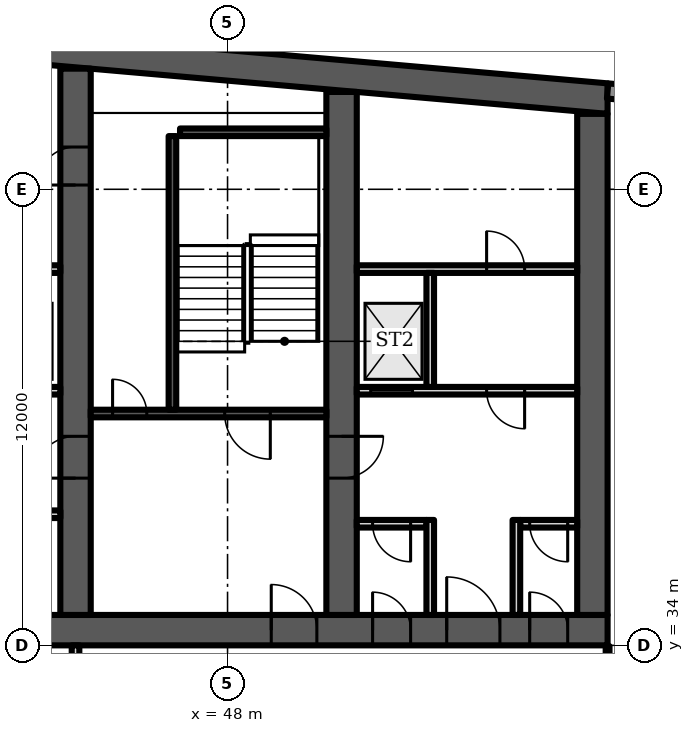
"""IFC4 building model, lengths in metres.
Left out: names, types, materials, properties, quantities, classifications, styles, units other than length and angle.
Written with IfcOpenShell. Run it as: python <this file> out.ifc"""

import sys

from ifc_helpers import new_model, si_unit, direction, frame, frame_2d, origin, place, context, subcontext, project, spatial, polyline, rectangle, outline, extrude, element, fill, save


model = new_model("IFC4")
c1 = context("Model", 3, precision=1e-05, world=origin(), true_north=direction((0.0, 1.0)))
c2 = subcontext(c1, "Body", "Model", "MODEL_VIEW")
j1 = project(units=[si_unit("LENGTHUNIT", "METRE"), si_unit("PLANEANGLEUNIT", "RADIAN")], contexts=[c1])
p1 = place(None, origin())
s1 = spatial("IfcSite", under=j1, at=p1, CompositionType="ELEMENT")
p2 = place(p1, origin())
s2 = spatial("IfcBuilding", under=s1, at=p2, CompositionType="ELEMENT")
p3 = place(p2, frame((0.0, 0.0, 177.1)))
s3 = spatial("IfcBuildingStorey", under=s2, at=p3, CompositionType="ELEMENT", Elevation=177.1)
p4 = place(p3, frame((0.0, 0.0, -0.0)))
e1 = element("IfcWall", 1, at=p4, inside=s3, PredefinedType="SHEAR", context=c2, shape_type="SweptSolid", body=[
    extrude(outline(polyline([(16.0, 47.984), (37.0, 49.822), (58.0, 47.984), (58.0, 48.787), (37.0, 50.625), (16.0, 48.787), (16.0, 47.984)])), origin(), (0.0, 0.0, 1.0), 3.6),
])
p5 = place(p3, frame((16.0, 34.4, 0.0), z_axis=(0.0, 0.0, 1.0), x_axis=(1.0, 0.0, 0.0)))
e2 = element("IfcWall", 2, at=p5, inside=s3, PredefinedType="SHEAR", context=c2, shape_type="SweptSolid", body=[
    extrude(rectangle(XDim=42.0, YDim=0.8, at=frame_2d((21.0, 0.0))), origin(), (0.0, 0.0, 1.0), 3.6),
])
p6 = place(p5, frame((1.75, 0.0, 0.0)))
e3 = element("IfcOpeningElement", 3, at=p6, cuts=e2, PredefinedType="OPENING", context=c2, shape_type="SweptSolid", body=[
    extrude(rectangle(XDim=1.0, YDim=2.1, at=frame_2d((0.5, 1.05))), frame((0.0, 0.41, 0.0), z_axis=(0.0, -1.0, 0.0), x_axis=(1.0, 0.0, 0.0)), (0.0, 0.0, 1.0), 0.82),
])
p7 = place(p5, frame((4.65, 0.0, 0.0)))
e4 = element("IfcOpeningElement", 4, at=p7, cuts=e2, PredefinedType="OPENING", context=c2, shape_type="SweptSolid", body=[
    extrude(rectangle(XDim=1.0, YDim=2.1, at=frame_2d((0.5, 1.05))), frame((0.0, 0.41, 0.0), z_axis=(0.0, -1.0, 0.0), x_axis=(1.0, 0.0, 0.0)), (0.0, 0.0, 1.0), 0.82),
])
p8 = place(p5, frame((7.65, 0.0, 0.0)))
e5 = element("IfcOpeningElement", 5, at=p8, cuts=e2, PredefinedType="OPENING", context=c2, shape_type="SweptSolid", body=[
    extrude(rectangle(XDim=1.2, YDim=2.1, at=frame_2d((0.6, 1.05))), frame((0.0, 0.41, 0.0), z_axis=(0.0, -1.0, 0.0), x_axis=(1.0, 0.0, 0.0)), (0.0, 0.0, 1.0), 0.82),
])
p9 = place(p5, frame((14.767, 0.0, 0.0)))
e6 = element("IfcOpeningElement", 6, at=p9, cuts=e2, PredefinedType="OPENING", context=c2, shape_type="SweptSolid", body=[
    extrude(rectangle(XDim=1.1, YDim=2.1, at=frame_2d((0.55, 1.05))), frame((0.0, 0.41, 0.0), z_axis=(0.0, -1.0, 0.0), x_axis=(1.0, 0.0, 0.0)), (0.0, 0.0, 1.0), 0.82),
])
p10 = place(p5, frame((19.133, 0.0, 0.0)))
e7 = element("IfcOpeningElement", 7, at=p10, cuts=e2, PredefinedType="OPENING", context=c2, shape_type="SweptSolid", body=[
    extrude(rectangle(XDim=1.1, YDim=2.1, at=frame_2d((0.55, 1.05))), frame((0.0, 0.41, 0.0), z_axis=(0.0, -1.0, 0.0), x_axis=(1.0, 0.0, 0.0)), (0.0, 0.0, 1.0), 0.82),
])
p11 = place(p5, frame((16.8, 0.0, 0.0)))
e8 = element("IfcOpeningElement", 8, at=p11, cuts=e2, PredefinedType="OPENING", context=c2, shape_type="SweptSolid", body=[
    extrude(rectangle(XDim=1.4, YDim=2.1, at=frame_2d((0.7, 1.05))), frame((0.0, 0.41, 0.0), z_axis=(0.0, -1.0, 0.0), x_axis=(1.0, 0.0, 0.0)), (0.0, 0.0, 1.0), 0.82),
])
p12 = place(p5, frame((21.767, 0.0, 0.0)))
e9 = element("IfcOpeningElement", 9, at=p12, cuts=e2, PredefinedType="OPENING", context=c2, shape_type="SweptSolid", body=[
    extrude(rectangle(XDim=1.1, YDim=2.1, at=frame_2d((0.55, 1.05))), frame((0.0, 0.41, 0.0), z_axis=(0.0, -1.0, 0.0), x_axis=(1.0, 0.0, 0.0)), (0.0, 0.0, 1.0), 0.82),
])
p13 = place(p5, frame((23.95, 0.0, 0.0)))
e10 = element("IfcOpeningElement", 10, at=p13, cuts=e2, PredefinedType="OPENING", context=c2, shape_type="SweptSolid", body=[
    extrude(rectangle(XDim=1.1, YDim=2.1, at=frame_2d((0.55, 1.05))), frame((0.0, 0.41, 0.0), z_axis=(0.0, -1.0, 0.0), x_axis=(1.0, 0.0, 0.0)), (0.0, 0.0, 1.0), 0.82),
])
p14 = place(p5, frame((26.133, 0.0, 0.0)))
e11 = element("IfcOpeningElement", 11, at=p14, cuts=e2, PredefinedType="OPENING", context=c2, shape_type="SweptSolid", body=[
    extrude(rectangle(XDim=1.1, YDim=2.1, at=frame_2d((0.55, 1.05))), frame((0.0, 0.41, 0.0), z_axis=(0.0, -1.0, 0.0), x_axis=(1.0, 0.0, 0.0)), (0.0, 0.0, 1.0), 0.82),
])
p15 = place(p5, frame((33.15, 0.0, 0.0)))
e12 = element("IfcOpeningElement", 12, at=p15, cuts=e2, PredefinedType="OPENING", context=c2, shape_type="SweptSolid", body=[
    extrude(rectangle(XDim=1.2, YDim=2.1, at=frame_2d((0.6, 1.05))), frame((0.0, 0.41, 0.0), z_axis=(0.0, -1.0, 0.0), x_axis=(1.0, 0.0, 0.0)), (0.0, 0.0, 1.0), 0.82),
])
p16 = place(p5, frame((35.817, 0.0, 0.0)))
e13 = element("IfcOpeningElement", 13, at=p16, cuts=e2, PredefinedType="OPENING", context=c2, shape_type="SweptSolid", body=[
    extrude(rectangle(XDim=1.0, YDim=2.1, at=frame_2d((0.5, 1.05))), frame((0.0, 0.41, 0.0), z_axis=(0.0, -1.0, 0.0), x_axis=(1.0, 0.0, 0.0)), (0.0, 0.0, 1.0), 0.82),
])
p17 = place(p5, frame((39.95, 0.0, 0.0)))
e14 = element("IfcOpeningElement", 14, at=p17, cuts=e2, PredefinedType="OPENING", context=c2, shape_type="SweptSolid", body=[
    extrude(rectangle(XDim=1.0, YDim=2.1, at=frame_2d((0.5, 1.05))), frame((0.0, 0.41, 0.0), z_axis=(0.0, -1.0, 0.0), x_axis=(1.0, 0.0, 0.0)), (0.0, 0.0, 1.0), 0.82),
])
p18 = place(p5, frame((37.767, 0.0, 0.0)))
e15 = element("IfcOpeningElement", 15, at=p18, cuts=e2, PredefinedType="OPENING", context=c2, shape_type="SweptSolid", body=[
    extrude(rectangle(XDim=1.4, YDim=2.1, at=frame_2d((0.7, 1.05))), frame((0.0, 0.41, 0.0), z_axis=(0.0, -1.0, 0.0), x_axis=(1.0, 0.0, 0.0)), (0.0, 0.0, 1.0), 0.82),
])
p19 = place(p3, frame((44.0, 34.8, 0.0), z_axis=(0.0, 0.0, 1.0), x_axis=(0.0, 1.0, 0.0)))
e16 = element("IfcWall", 16, at=p19, inside=s3, PredefinedType="SHEAR", context=c2, shape_type="SweptSolid", body=[
    extrude(rectangle(XDim=14.374, YDim=0.8, at=frame_2d((7.187, 0.0))), origin(), (0.0, 0.0, 1.0), 3.6),
])
p20 = place(p19, frame((11.312, 0.0, 0.0)))
e17 = element("IfcOpeningElement", 17, at=p20, cuts=e16, PredefinedType="OPENING", context=c2, shape_type="SweptSolid", body=[
    extrude(rectangle(XDim=1.0, YDim=2.1, at=frame_2d((0.5, 1.05))), frame((0.0, 0.41, 0.0), z_axis=(0.0, -1.0, 0.0), x_axis=(1.0, 0.0, 0.0)), (0.0, 0.0, 1.0), 0.82),
])
p21 = place(p19, frame((3.6, 0.0, 0.0)))
e18 = element("IfcOpeningElement", 18, at=p21, cuts=e16, PredefinedType="OPENING", context=c2, shape_type="SweptSolid", body=[
    extrude(rectangle(XDim=1.1, YDim=2.1, at=frame_2d((0.55, 1.05))), frame((0.0, 0.41, 0.0), z_axis=(0.0, -1.0, 0.0), x_axis=(1.0, 0.0, 0.0)), (0.0, 0.0, 1.0), 0.82),
])
p22 = place(p3, frame((51.0, 34.8, 0.0), z_axis=(0.0, 0.0, 1.0), x_axis=(0.0, 1.0, 0.0)))
e19 = element("IfcWall", 19, at=p22, inside=s3, PredefinedType="SHEAR", context=c2, shape_type="SweptSolid", body=[
    extrude(rectangle(XDim=13.762, YDim=0.8, at=frame_2d((6.881, 0.0))), origin(), (0.0, 0.0, 1.0), 3.6),
])
p23 = place(p22, frame((3.6, 0.0, 0.0)))
e20 = element("IfcOpeningElement", 20, at=p23, cuts=e19, PredefinedType="OPENING", context=c2, shape_type="SweptSolid", body=[
    extrude(rectangle(XDim=1.1, YDim=2.1, at=frame_2d((0.55, 1.05))), frame((0.0, 0.41, 0.0), z_axis=(0.0, -1.0, 0.0), x_axis=(1.0, 0.0, 0.0)), (0.0, 0.0, 1.0), 0.82),
])
p24 = place(p3, frame((57.6, 34.8, 0.0), z_axis=(0.0, 0.0, 1.0), x_axis=(0.0, 1.0, 0.0)))
e21 = element("IfcWall", 21, at=p24, inside=s3, PredefinedType="SHEAR", context=c2, shape_type="SweptSolid", body=[
    extrude(rectangle(XDim=13.184, YDim=0.8, at=frame_2d((6.592, 0.0))), origin(), (0.0, 0.0, 1.0), 3.6),
])
p25 = place(p3, frame((60.983, 48.326, 0.0), z_axis=(0.0, 0.0, 1.0), x_axis=(-0.996194, 0.087168, 0.0)))
e22 = element("IfcWall", 22, at=p25, inside=s3, PredefinedType="SOLIDWALL", context=c2, shape_type="SweptSolid", body=[
    extrude(rectangle(XDim=2.994, YDim=0.4, at=frame_2d((1.497, 0.0))), origin(), (0.0, 0.0, 1.0), 3.2),
])
p26 = place(p3, frame((37.4, 40.7, 0.0), z_axis=(0.0, 0.0, 1.0), x_axis=(1.0, 0.0, 0.0)))
e23 = element("IfcWall", 23, at=p26, inside=s3, PredefinedType="PARTITIONING", context=c2, shape_type="SweptSolid", body=[
    extrude(rectangle(XDim=6.2, YDim=0.2, at=frame_2d((3.1, 0.0))), origin(), (0.0, 0.0, 1.0), 3.2),
])
p27 = place(p26, frame((0.367, 0.0, 0.0)))
e24 = element("IfcOpeningElement", 24, at=p27, cuts=e23, PredefinedType="OPENING", context=c2, shape_type="SweptSolid", body=[
    extrude(rectangle(XDim=1.1, YDim=2.1, at=frame_2d((0.55, 1.05))), frame((0.0, 0.11, 0.0), z_axis=(0.0, -1.0, 0.0), x_axis=(1.0, 0.0, 0.0)), (0.0, 0.0, 1.0), 0.22),
])
p28 = place(p26, frame((2.55, 0.0, 0.0)))
e25 = element("IfcOpeningElement", 25, at=p28, cuts=e23, PredefinedType="OPENING", context=c2, shape_type="SweptSolid", body=[
    extrude(rectangle(XDim=1.1, YDim=2.1, at=frame_2d((0.55, 1.05))), frame((0.0, 0.11, 0.0), z_axis=(0.0, -1.0, 0.0), x_axis=(1.0, 0.0, 0.0)), (0.0, 0.0, 1.0), 0.22),
])
p29 = place(p26, frame((4.733, 0.0, 0.0)))
e26 = element("IfcOpeningElement", 26, at=p29, cuts=e23, PredefinedType="OPENING", context=c2, shape_type="SweptSolid", body=[
    extrude(rectangle(XDim=1.1, YDim=2.1, at=frame_2d((0.55, 1.05))), frame((0.0, 0.11, 0.0), z_axis=(0.0, -1.0, 0.0), x_axis=(1.0, 0.0, 0.0)), (0.0, 0.0, 1.0), 0.22),
])
p30 = place(p3, frame((0.0, 0.0, -0.0)))
e27 = element("IfcWall", 27, at=p30, inside=s3, PredefinedType="PARTITIONING", context=c2, shape_type="SweptSolid", body=[
    extrude(outline(polyline([(41.567, 37.1), (39.433, 37.1), (39.433, 34.8), (39.233, 34.8), (39.233, 37.65), (37.4, 37.65), (37.4, 37.85), (39.233, 37.85), (39.433, 37.85), (39.433, 37.3), (41.567, 37.3), (41.567, 37.55), (41.767, 37.55), (43.6, 37.55), (43.6, 37.35), (41.767, 37.35), (41.767, 34.8), (41.567, 34.8), (41.567, 37.1)])), origin(), (0.0, 0.0, 1.0), 3.2),
])
p31 = place(p3, frame((0.0, 0.0, -0.0)))
e28 = element("IfcWall", 28, at=p31, inside=s3, PredefinedType="PARTITIONING", context=c2, shape_type="SweptSolid", body=[
    extrude(outline(polyline([(39.433, 40.8), (39.233, 40.8), (39.233, 43.8), (37.4, 43.8), (37.4, 44.0), (43.6, 44.0), (43.6, 43.8), (41.767, 43.8), (41.767, 40.8), (41.567, 40.8), (41.567, 43.8), (39.433, 43.8), (39.433, 40.8)])), origin(), (0.0, 0.0, 1.0), 3.2),
])
p32 = place(p3, frame((44.4, 40.1, 0.0), z_axis=(0.0, 0.0, 1.0), x_axis=(1.0, 0.0, 0.0)))
e29 = element("IfcWall", 29, at=p32, inside=s3, PredefinedType="SHEAR", context=c2, shape_type="SweptSolid", body=[
    extrude(rectangle(XDim=6.2, YDim=0.2, at=frame_2d((3.1, 0.0))), origin(), (0.0, 0.0, 1.0), 3.2),
])
p33 = place(p32, frame((3.525, 0.0, 0.0)))
e30 = element("IfcOpeningElement", 30, at=p33, cuts=e29, PredefinedType="OPENING", context=c2, shape_type="SweptSolid", body=[
    extrude(rectangle(XDim=1.2, YDim=2.1, at=frame_2d((0.6, 1.05))), frame((0.0, 0.11, 0.0), z_axis=(0.0, -1.0, 0.0), x_axis=(1.0, 0.0, 0.0)), (0.0, 0.0, 1.0), 0.22),
])
p34 = place(p32, frame((0.575, 0.0, 0.0)))
e31 = element("IfcOpeningElement", 31, at=p34, cuts=e29, PredefinedType="OPENING", context=c2, shape_type="SweptSolid", body=[
    extrude(rectangle(XDim=0.9, YDim=2.1, at=frame_2d((0.45, 1.05))), frame((0.0, 0.11, 0.0), z_axis=(0.0, -1.0, 0.0), x_axis=(1.0, 0.0, 0.0)), (0.0, 0.0, 1.0), 0.22),
])
p35 = place(p3, frame((46.55, 40.2, 0.0), z_axis=(0.0, 0.0, 1.0), x_axis=(0.0, 1.0, 0.0)))
e32 = element("IfcWall", 32, at=p35, inside=s3, PredefinedType="SHEAR", context=c2, shape_type="SweptSolid", body=[
    extrude(rectangle(XDim=7.2, YDim=0.2, at=frame_2d((3.6, 0.0))), origin(), (0.0, 0.0, 1.0), 3.2),
])
p36 = place(p3, frame((46.75, 47.5, 0.0), z_axis=(0.0, 0.0, 1.0), x_axis=(1.0, 0.0, 0.0)))
e33 = element("IfcWall", 33, at=p36, inside=s3, PredefinedType="SHEAR", context=c2, shape_type="SweptSolid", body=[
    extrude(rectangle(XDim=3.85, YDim=0.2, at=frame_2d((1.925, 0.0))), origin(), (0.0, 0.0, 1.0), 3.2),
])
p37 = place(p3, frame((51.4, 37.2, 0.0), z_axis=(0.0, 0.0, 1.0), x_axis=(1.0, 0.0, 0.0)))
e34 = element("IfcWall", 34, at=p37, inside=s3, PredefinedType="PARTITIONING", context=c2, shape_type="SweptSolid", body=[
    extrude(rectangle(XDim=1.833, YDim=0.2, at=frame_2d((0.917, 0.0))), origin(), (0.0, 0.0, 1.0), 3.2),
])
p38 = place(p37, frame((0.417, 0.0, 0.0)))
e35 = element("IfcOpeningElement", 35, at=p38, cuts=e34, PredefinedType="OPENING", context=c2, shape_type="SweptSolid", body=[
    extrude(rectangle(XDim=1.0, YDim=2.1, at=frame_2d((0.5, 1.05))), frame((0.0, 0.11, 0.0), z_axis=(0.0, -1.0, 0.0), x_axis=(1.0, 0.0, 0.0)), (0.0, 0.0, 1.0), 0.22),
])
p39 = place(p3, frame((55.7, 37.2, 0.0), z_axis=(0.0, 0.0, 1.0), x_axis=(1.0, 0.0, 0.0)))
e36 = element("IfcWall", 36, at=p39, inside=s3, PredefinedType="PARTITIONING", context=c2, shape_type="SweptSolid", body=[
    extrude(rectangle(XDim=1.5, YDim=0.2, at=frame_2d((0.75, 0.0))), origin(), (0.0, 0.0, 1.0), 3.2),
])
p40 = place(p39, frame((0.25, 0.0, 0.0)))
e37 = element("IfcOpeningElement", 37, at=p40, cuts=e36, PredefinedType="OPENING", context=c2, shape_type="SweptSolid", body=[
    extrude(rectangle(XDim=1.0, YDim=2.1, at=frame_2d((0.5, 1.05))), frame((0.0, 0.11, 0.0), z_axis=(0.0, -1.0, 0.0), x_axis=(1.0, 0.0, 0.0)), (0.0, 0.0, 1.0), 0.22),
])
p41 = place(p3, frame((51.4, 40.7, 0.0), z_axis=(0.0, 0.0, 1.0), x_axis=(1.0, 0.0, 0.0)))
e38 = element("IfcWall", 38, at=p41, inside=s3, PredefinedType="PARTITIONING", context=c2, shape_type="SweptSolid", body=[
    extrude(rectangle(XDim=5.8, YDim=0.2, at=frame_2d((2.9, 0.0))), origin(), (0.0, 0.0, 1.0), 3.2),
])
p42 = place(p41, frame((0.367, 0.0, 0.0)))
e39 = element("IfcOpeningElement", 39, at=p42, cuts=e38, PredefinedType="OPENING", context=c2, shape_type="SweptSolid", body=[
    extrude(rectangle(XDim=1.1, YDim=2.1, at=frame_2d((0.55, 1.05))), frame((0.0, 0.11, 0.0), z_axis=(0.0, -1.0, 0.0), x_axis=(1.0, 0.0, 0.0)), (0.0, 0.0, 1.0), 0.22),
])
p43 = place(p41, frame((3.417, 0.0, 0.0)))
e40 = element("IfcOpeningElement", 40, at=p43, cuts=e38, PredefinedType="OPENING", context=c2, shape_type="SweptSolid", body=[
    extrude(rectangle(XDim=1.0, YDim=2.1, at=frame_2d((0.5, 1.05))), frame((0.0, 0.11, 0.0), z_axis=(0.0, -1.0, 0.0), x_axis=(1.0, 0.0, 0.0)), (0.0, 0.0, 1.0), 0.22),
])
p44 = place(p3, frame((51.4, 43.9, 0.0), z_axis=(0.0, 0.0, 1.0), x_axis=(1.0, 0.0, 0.0)))
e41 = element("IfcWall", 41, at=p44, inside=s3, PredefinedType="PARTITIONING", context=c2, shape_type="SweptSolid", body=[
    extrude(rectangle(XDim=5.8, YDim=0.2, at=frame_2d((2.9, 0.0))), origin(), (0.0, 0.0, 1.0), 3.2),
])
p45 = place(p44, frame((3.417, 0.0, 0.0)))
e42 = element("IfcOpeningElement", 42, at=p45, cuts=e41, PredefinedType="OPENING", context=c2, shape_type="SweptSolid", body=[
    extrude(rectangle(XDim=1.0, YDim=2.1, at=frame_2d((0.5, 1.05))), frame((0.0, 0.11, 0.0), z_axis=(0.0, -1.0, 0.0), x_axis=(1.0, 0.0, 0.0)), (0.0, 0.0, 1.0), 0.22),
])
p46 = place(p3, frame((0.0, 0.0, -0.0)))
e43 = element("IfcWall", 43, at=p46, inside=s3, PredefinedType="PARTITIONING", context=c2, shape_type="SweptSolid", body=[
    extrude(outline(polyline([(53.233, 34.8), (53.233, 37.3), (53.433, 37.3), (53.433, 34.8), (53.233, 34.8)])), origin(), (0.0, 0.0, 1.0), 3.2),
])
p47 = place(p3, frame((0.0, 0.0, -0.0)))
e44 = element("IfcWall", 44, at=p47, inside=s3, PredefinedType="PARTITIONING", context=c2, shape_type="SweptSolid", body=[
    extrude(outline(polyline([(55.5, 34.8), (55.5, 37.3), (55.7, 37.3), (55.7, 34.8), (55.5, 34.8)])), origin(), (0.0, 0.0, 1.0), 3.2),
])
p48 = place(p3, frame((0.0, 0.0, -0.0)))
e45 = element("IfcWall", 45, at=p48, inside=s3, PredefinedType="PARTITIONING", context=c2, shape_type="SweptSolid", body=[
    extrude(outline(polyline([(53.433, 40.8), (53.433, 43.8), (53.233, 43.8), (53.233, 40.8), (53.433, 40.8)])), origin(), (0.0, 0.0, 1.0), 3.2),
])
p49 = place(p3, frame((44.0, 30.5, 0.0), z_axis=(0.0, 0.0, 1.0), x_axis=(0.0, 1.0, 0.0)))
e46 = element("IfcWall", 46, at=p49, inside=s3, PredefinedType="PARTITIONING", context=c2, shape_type="SweptSolid", body=[
    extrude(rectangle(XDim=3.5, YDim=0.2, at=frame_2d((1.75, 0.0))), origin(), (0.0, 0.0, 1.0), 3.2),
])
p50 = place(p49, frame((1.2, 0.0, 0.0)))
e47 = element("IfcOpeningElement", 47, at=p50, cuts=e46, PredefinedType="OPENING", context=c2, shape_type="SweptSolid", body=[
    extrude(rectangle(XDim=1.1, YDim=2.1, at=frame_2d((0.55, 1.05))), frame((0.0, 0.11, 0.0), z_axis=(0.0, -1.0, 0.0), x_axis=(1.0, 0.0, 0.0)), (0.0, 0.0, 1.0), 0.22),
])
p51 = place(p3, frame((58.0, 31.925, 0.0), z_axis=(0.0, 0.0, 1.0), x_axis=(0.0, 1.0, 0.0)))
e48 = element("IfcWall", 48, at=p51, inside=s3, PredefinedType="PARTITIONING", context=c2, shape_type="SweptSolid", body=[
    extrude(rectangle(XDim=2.055, YDim=0.1, at=frame_2d((1.027, 0.0))), origin(), (0.0, 0.0, 1.0), 3.2),
])
p52 = place(p20, origin())
e49 = element("IfcDoor", 49, at=p52, inside=s3, OperationType="SINGLE_SWING_LEFT", PredefinedType="DOOR", context=c2, shape_type="SweptSolid", body=[
    extrude(rectangle(XDim=1.0, YDim=2.1, at=frame_2d((0.5, 1.05))), frame((0.0, 0.4, 0.0), z_axis=(0.0, -1.0, 0.0), x_axis=(1.0, 0.0, 0.0)), (0.0, 0.0, 1.0), 0.8),
])
fill(e17, e49)
p53 = place(p33, origin())
e50 = element("IfcDoor", 50, at=p53, inside=s3, OperationType="SINGLE_SWING_RIGHT", PredefinedType="DOOR", context=c2, shape_type="SweptSolid", body=[
    extrude(rectangle(XDim=1.2, YDim=2.1, at=frame_2d((0.6, 1.05))), frame((0.0, 0.025, 0.0), z_axis=(0.0, -1.0, 0.0), x_axis=(1.0, 0.0, 0.0)), (0.0, 0.0, 1.0), 0.05),
])
fill(e30, e50)
p54 = place(p34, origin())
e51 = element("IfcDoor", 51, at=p54, inside=s3, OperationType="SINGLE_SWING_LEFT", PredefinedType="DOOR", context=c2, shape_type="SweptSolid", body=[
    extrude(rectangle(XDim=0.9, YDim=2.1, at=frame_2d((0.45, 1.05))), frame((0.0, 0.025, 0.0), z_axis=(0.0, -1.0, 0.0), x_axis=(1.0, 0.0, 0.0)), (0.0, 0.0, 1.0), 0.05),
])
fill(e31, e51)
p55 = place(p15, origin())
e52 = element("IfcDoor", 52, at=p55, inside=s3, OperationType="SINGLE_SWING_LEFT", PredefinedType="DOOR", context=c2, shape_type="SweptSolid", body=[
    extrude(rectangle(XDim=1.2, YDim=2.1, at=frame_2d((0.6, 1.05))), frame((0.0, 0.025, 0.0), z_axis=(0.0, -1.0, 0.0), x_axis=(1.0, 0.0, 0.0)), (0.0, 0.0, 1.0), 0.05),
])
fill(e12, e52)
p56 = place(p16, origin())
e53 = element("IfcDoor", 53, at=p56, inside=s3, OperationType="SINGLE_SWING_LEFT", PredefinedType="DOOR", context=c2, shape_type="SweptSolid", body=[
    extrude(rectangle(XDim=1.0, YDim=2.1, at=frame_2d((0.5, 1.05))), frame((0.0, 0.4, 0.0), z_axis=(0.0, -1.0, 0.0), x_axis=(1.0, 0.0, 0.0)), (0.0, 0.0, 1.0), 0.8),
])
fill(e13, e53)
p57 = place(p38, origin())
e54 = element("IfcDoor", 54, at=p57, inside=s3, OperationType="SINGLE_SWING_RIGHT", PredefinedType="DOOR", context=c2, shape_type="SweptSolid", body=[
    extrude(rectangle(XDim=1.0, YDim=2.1, at=frame_2d((0.5, 1.05))), frame((0.0, 0.025, 0.0), z_axis=(0.0, -1.0, 0.0), x_axis=(1.0, 0.0, 0.0)), (0.0, 0.0, 1.0), 0.05),
])
fill(e35, e54)
p58 = place(p17, origin())
e55 = element("IfcDoor", 55, at=p58, inside=s3, OperationType="SINGLE_SWING_LEFT", PredefinedType="DOOR", context=c2, shape_type="SweptSolid", body=[
    extrude(rectangle(XDim=1.0, YDim=2.1, at=frame_2d((0.5, 1.05))), frame((0.0, 0.4, 0.0), z_axis=(0.0, -1.0, 0.0), x_axis=(1.0, 0.0, 0.0)), (0.0, 0.0, 1.0), 0.8),
])
fill(e14, e55)
p59 = place(p40, origin())
e56 = element("IfcDoor", 56, at=p59, inside=s3, OperationType="SINGLE_SWING_RIGHT", PredefinedType="DOOR", context=c2, shape_type="SweptSolid", body=[
    extrude(rectangle(XDim=1.0, YDim=2.1, at=frame_2d((0.5, 1.05))), frame((0.0, 0.025, 0.0), z_axis=(0.0, -1.0, 0.0), x_axis=(1.0, 0.0, 0.0)), (0.0, 0.0, 1.0), 0.05),
])
fill(e37, e56)
p60 = place(p18, origin())
e57 = element("IfcDoor", 57, at=p60, inside=s3, OperationType="DOUBLE_DOOR_SINGLE_SWING", PredefinedType="DOOR", context=c2, shape_type="SweptSolid", body=[
    extrude(rectangle(XDim=1.4, YDim=2.1, at=frame_2d((0.7, 1.05))), frame((0.0, 0.025, 0.0), z_axis=(0.0, -1.0, 0.0), x_axis=(1.0, 0.0, 0.0)), (0.0, 0.0, 1.0), 0.05),
])
fill(e15, e57)
p61 = place(p42, origin())
e58 = element("IfcDoor", 58, at=p61, inside=s3, OperationType="DOUBLE_DOOR_SLIDING", PredefinedType="DOOR", context=c2, shape_type="SweptSolid", body=[
    extrude(rectangle(XDim=1.1, YDim=2.1, at=frame_2d((0.55, 1.05))), frame((0.0, 0.025, 0.0), z_axis=(0.0, -1.0, 0.0), x_axis=(1.0, 0.0, 0.0)), (0.0, 0.0, 1.0), 0.05),
])
fill(e39, e58)
p62 = place(p43, origin())
e59 = element("IfcDoor", 59, at=p62, inside=s3, OperationType="SINGLE_SWING_RIGHT", PredefinedType="DOOR", context=c2, shape_type="SweptSolid", body=[
    extrude(rectangle(XDim=1.0, YDim=2.1, at=frame_2d((0.5, 1.05))), frame((0.0, 0.025, 0.0), z_axis=(0.0, -1.0, 0.0), x_axis=(1.0, 0.0, 0.0)), (0.0, 0.0, 1.0), 0.05),
])
fill(e40, e59)
p63 = place(p45, origin())
e60 = element("IfcDoor", 60, at=p63, inside=s3, OperationType="SINGLE_SWING_LEFT", PredefinedType="DOOR", context=c2, shape_type="SweptSolid", body=[
    extrude(rectangle(XDim=1.0, YDim=2.1, at=frame_2d((0.5, 1.05))), frame((0.0, 0.025, 0.0), z_axis=(0.0, -1.0, 0.0), x_axis=(1.0, 0.0, 0.0)), (0.0, 0.0, 1.0), 0.05),
])
fill(e42, e60)
p64 = place(p21, origin())
e61 = element("IfcDoor", 61, at=p64, inside=s3, OperationType="SINGLE_SWING_LEFT", PredefinedType="DOOR", context=c2, shape_type="SweptSolid", body=[
    extrude(rectangle(XDim=1.1, YDim=2.1, at=frame_2d((0.55, 1.05))), frame((0.0, 0.025, 0.0), z_axis=(0.0, -1.0, 0.0), x_axis=(1.0, 0.0, 0.0)), (0.0, 0.0, 1.0), 0.05),
])
fill(e18, e61)
p65 = place(p23, origin())
e62 = element("IfcDoor", 62, at=p65, inside=s3, OperationType="SINGLE_SWING_RIGHT", PredefinedType="DOOR", context=c2, shape_type="SweptSolid", body=[
    extrude(rectangle(XDim=1.1, YDim=2.1, at=frame_2d((0.55, 1.05))), frame((0.0, 0.025, 0.0), z_axis=(0.0, -1.0, 0.0), x_axis=(1.0, 0.0, 0.0)), (0.0, 0.0, 1.0), 0.05),
])
fill(e20, e62)
save(model, sys.argv[1])
